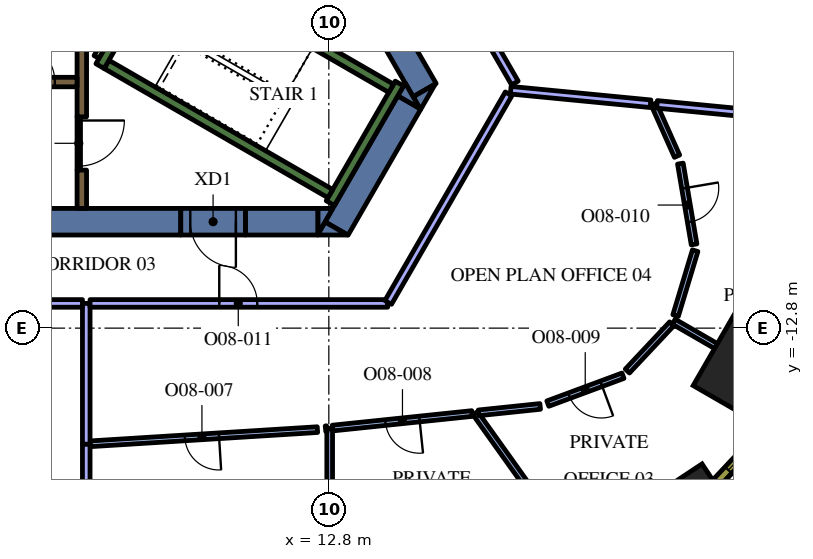
"""IFC4 building model, lengths in metres.
Left out: names, types, materials, properties, quantities, classifications, styles, units other than length and angle.
Written with IfcOpenShell. Run it as: python <this file> out.ifc"""

import sys

from ifc_helpers import new_model, si_unit, direction, frame, frame_2d, origin, origin_2d, place, context, subcontext, project, spatial, polyline, rectangle, outline, extrude, element, fill, save


model = new_model("IFC4")
c1 = context("Model", 3, precision=1e-05, world=origin(), true_north=direction((0.0, 1.0)))
c2 = subcontext(c1, "Body", "Model", "MODEL_VIEW")
j1 = project(units=[si_unit("LENGTHUNIT", "METRE"), si_unit("PLANEANGLEUNIT", "RADIAN")], contexts=[c1])
p1 = place(None, origin())
s1 = spatial("IfcSite", under=j1, at=p1, CompositionType="ELEMENT")
p2 = place(p1, origin())
s2 = spatial("IfcBuilding", under=s1, at=p2, CompositionType="ELEMENT")
p3 = place(p2, frame((0.0, 0.0, 226.8)))
s3 = spatial("IfcBuildingStorey", under=s2, at=p3, CompositionType="ELEMENT", Elevation=226.8)
p4 = place(p3, frame((24.027, -13.872, 0.0), z_axis=(0.0, 0.0, 1.0), x_axis=(0.866025403784, -0.5, 0.0)))
e1 = element("IfcColumn", 1, at=p4, inside=s3, PredefinedType="COLUMN", context=c2, shape_type="SweptSolid", body=[
    extrude(rectangle(XDim=2.4, YDim=2.4, at=origin_2d()), origin(), (0.0, 0.0, 1.0), 4.2),
])
p5 = place(p3, frame((22.494, -16.997, 0.0), z_axis=(0.0, 0.0, 1.0), x_axis=(0.833238868178, 0.552913183563, 0.0)))
e2 = element("IfcColumn", 2, at=p5, inside=s3, PredefinedType="COLUMN", context=c2, shape_type="SweptSolid", body=[
    extrude(rectangle(XDim=0.9, YDim=0.9, at=origin_2d()), origin(), (0.0, 0.0, 1.0), 4.2),
])
p6 = place(p3, frame((9.085, 4.264, 0.0), z_axis=(0.0, 0.0, 1.0), x_axis=(0.499998082512, -0.866026510844, 0.0)))
e3 = element("IfcWall", 3, at=p6, inside=s3, PredefinedType="SOLIDWALL", context=c2, shape_type="SweptSolid", body=[
    extrude(rectangle(XDim=12.472, YDim=0.7, at=frame_2d((6.236, 0.0))), origin(), (0.0, 0.0, 1.0), 4.2),
])
p7 = place(p3, origin())
e4 = element("IfcWall", 4, at=p7, inside=s3, PredefinedType="SOLIDWALL", context=c2, shape_type="SweptSolid", body=[
    extrude(outline(polyline([(15.213, -7.05), (15.019, -6.714), (15.601, -6.378), (15.213, -7.05)])), origin(), (0.0, 0.0, 1.0), 4.2),
])
p8 = place(p3, frame((13.003, -10.179, 0.0), z_axis=(0.0, 0.0, 1.0), x_axis=(0.499972675833, 0.866041178825, 0.0)))
e5 = element("IfcWall", 5, at=p8, inside=s3, PredefinedType="SOLIDWALL", context=c2, shape_type="SweptSolid", body=[
    extrude(rectangle(XDim=3.829, YDim=0.7, at=frame_2d((1.915, 0.0))), origin(), (0.0, 0.0, 1.0), 4.2),
])
e6 = element("IfcWall", 6, at=p7, inside=s3, PredefinedType="SOLIDWALL", context=c2, shape_type="SweptSolid", body=[
    extrude(outline(polyline([(12.698, -10.005), (13.296, -10.35), (12.5, -10.35), (12.698, -10.005)])), origin(), (0.0, 0.0, 1.0), 4.2),
])
e7 = element("IfcWall", 7, at=p7, inside=s3, PredefinedType="SOLIDWALL", context=c2, shape_type="SweptSolid", body=[
    extrude(outline(polyline([(14.809, -6.35), (15.197, -7.022), (14.615, -6.686), (14.809, -6.35)])), origin(), (0.0, 0.0, 1.0), 4.2),
])
p9 = place(p3, frame((10.604, -10.0, 0.0), z_axis=(0.0, 0.0, 1.0), x_axis=(1.0, 0.0, 0.0)))
e8 = element("IfcWall", 8, at=p9, inside=s3, PredefinedType="SOLIDWALL", context=c2, shape_type="SweptSolid", body=[
    extrude(rectangle(XDim=1.909, YDim=0.7, at=frame_2d((0.955, 0.0))), origin(), (0.0, 0.0, 1.0), 4.2),
])
e9 = element("IfcWall", 9, at=p7, inside=s3, PredefinedType="SOLIDWALL", context=c2, shape_type="SweptSolid", body=[
    extrude(outline(polyline([(12.904, -9.65), (12.516, -10.322), (12.516, -9.65), (12.904, -9.65)])), origin(), (0.0, 0.0, 1.0), 4.2),
])
p10 = place(p3, frame((8.904, -10.0, 0.0), z_axis=(0.0, 0.0, 1.0), x_axis=(-1.0, 0.0, 0.0)))
e10 = element("IfcWall", 10, at=p10, inside=s3, PredefinedType="SOLIDWALL", context=c2, shape_type="SweptSolid", body=[
    extrude(rectangle(XDim=22.226, YDim=0.7, at=frame_2d((11.113, 0.0))), origin(), (0.0, 0.0, 1.0), 4.2),
])
p11 = place(p3, frame((12.84, -9.511, 0.0), z_axis=(0.0, 0.0, 1.0), x_axis=(0.500048121057, 0.865997619297, 0.0)))
e11 = element("IfcWall", 11, at=p11, inside=s3, PredefinedType="SOLIDWALL", context=c2, shape_type="SweptSolid", body=[
    extrude(rectangle(XDim=3.634, YDim=0.25, at=frame_2d((1.817, 0.0))), origin(), (0.0, 0.0, 1.0), 4.2),
])
p12 = place(p3, frame((12.84, -9.261, 0.0), z_axis=(0.0, 0.0, 1.0), x_axis=(-0.866013990052, 0.500019768644, 0.0)))
e12 = element("IfcWall", 12, at=p12, inside=s3, PredefinedType="SOLIDWALL", context=c2, shape_type="SweptSolid", body=[
    extrude(rectangle(XDim=6.8, YDim=0.25, at=frame_2d((3.4, 0.0))), origin(), (0.0, 0.0, 1.0), 4.2),
])
p13 = place(p3, frame((6.78, -5.906, 0.0), z_axis=(0.0, 0.0, 1.0), x_axis=(0.500223362819, 0.865896406789, 0.0)))
e13 = element("IfcWall", 13, at=p13, inside=s3, PredefinedType="SOLIDWALL", context=c2, shape_type="SweptSolid", body=[
    extrude(rectangle(XDim=0.675, YDim=0.25, at=frame_2d((0.337, 0.0))), origin(), (0.0, 0.0, 1.0), 4.2),
])
p14 = place(p3, frame((8.334, -2.964, 0.0), z_axis=(0.0, 0.0, 1.0), x_axis=(0.866016039709, -0.500016218704, 0.0)))
e14 = element("IfcWall", 14, at=p14, inside=s3, PredefinedType="SOLIDWALL", context=c2, shape_type="SweptSolid", body=[
    extrude(rectangle(XDim=7.05, YDim=0.25, at=frame_2d((3.525, 0.0))), origin(), (0.0, 0.0, 1.0), 4.2),
])
p15 = place(p3, frame((6.3, -7.24, 0.0), z_axis=(0.0, 0.0, 1.0), x_axis=(0.0, 1.0, 0.0)))
e15 = element("IfcWall", 15, at=p15, inside=s3, PredefinedType="SOLIDWALL", context=c2, shape_type="SweptSolid", body=[
    extrude(rectangle(XDim=3.556, YDim=0.25, at=frame_2d((1.778, 0.0))), origin(), (0.0, 0.0, 1.0), 4.2),
])
p16 = place(p3, frame((6.3, -9.65, 0.0), z_axis=(0.0, 0.0, 1.0), x_axis=(0.0, 1.0, 0.0)))
e16 = element("IfcWall", 16, at=p16, inside=s3, PredefinedType="SOLIDWALL", context=c2, shape_type="SweptSolid", body=[
    extrude(rectangle(XDim=1.008, YDim=0.25, at=frame_2d((0.504, 0.0))), origin(), (0.0, 0.0, 1.0), 4.2),
])
p17 = place(p3, frame((6.945, -5.222, 0.0), z_axis=(0.0, 0.0, 1.0), x_axis=(-0.499818422106, -0.866130212453, 0.0)))
e17 = element("IfcWall", 17, at=p17, inside=s3, PredefinedType="PARTITIONING", context=c2, shape_type="SweptSolid", body=[
    extrude(rectangle(XDim=0.514, YDim=0.15, at=frame_2d((0.257, 0.0))), origin(), (0.0, 0.0, 1.0), 3.45),
])
p18 = place(p3, frame((-6.175, -6.325, 0.0), z_axis=(0.0, 0.0, 1.0), x_axis=(1.0, 0.0, 0.0)))
e18 = element("IfcWall", 18, at=p18, inside=s3, PredefinedType="SOLIDWALL", context=c2, shape_type="SweptSolid", body=[
    extrude(rectangle(XDim=12.35, YDim=0.25, at=frame_2d((6.175, 0.0))), origin(), (0.0, 0.0, 1.0), 4.2),
])
p19 = place(p18, frame((0.585, 0.0, 0.0)))
e19 = element("IfcOpeningElement", 19, at=p19, cuts=e18, PredefinedType="OPENING", context=c2, shape_type="SweptSolid", body=[
    extrude(rectangle(XDim=1.1, YDim=2.1, at=frame_2d((0.55, 1.05))), frame((0.0, 0.135, 0.0), z_axis=(0.0, -1.0, 0.0), x_axis=(1.0, 0.0, 0.0)), (0.0, 0.0, 1.0), 0.27),
])
p20 = place(p18, frame((3.105, 0.0, 0.0)))
e20 = element("IfcOpeningElement", 20, at=p20, cuts=e18, PredefinedType="OPENING", context=c2, shape_type="SweptSolid", body=[
    extrude(rectangle(XDim=1.1, YDim=2.1, at=frame_2d((0.55, 1.05))), frame((0.0, 0.135, 0.0), z_axis=(0.0, -1.0, 0.0), x_axis=(1.0, 0.0, 0.0)), (0.0, 0.0, 1.0), 0.27),
])
p21 = place(p18, frame((5.625, 0.0, 0.0)))
e21 = element("IfcOpeningElement", 21, at=p21, cuts=e18, PredefinedType="OPENING", context=c2, shape_type="SweptSolid", body=[
    extrude(rectangle(XDim=1.1, YDim=2.1, at=frame_2d((0.55, 1.05))), frame((0.0, 0.135, 0.0), z_axis=(0.0, -1.0, 0.0), x_axis=(1.0, 0.0, 0.0)), (0.0, 0.0, 1.0), 0.27),
])
p22 = place(p18, frame((8.145, 0.0, 0.0)))
e22 = element("IfcOpeningElement", 22, at=p22, cuts=e18, PredefinedType="OPENING", context=c2, shape_type="SweptSolid", body=[
    extrude(rectangle(XDim=1.1, YDim=2.1, at=frame_2d((0.55, 1.05))), frame((0.0, 0.135, 0.0), z_axis=(0.0, -1.0, 0.0), x_axis=(1.0, 0.0, 0.0)), (0.0, 0.0, 1.0), 0.27),
])
p23 = place(p18, frame((10.665, 0.0, 0.0)))
e23 = element("IfcOpeningElement", 23, at=p23, cuts=e18, PredefinedType="OPENING", context=c2, shape_type="SweptSolid", body=[
    extrude(rectangle(XDim=1.1, YDim=2.1, at=frame_2d((0.55, 1.05))), frame((0.0, 0.135, 0.0), z_axis=(0.0, -1.0, 0.0), x_axis=(1.0, 0.0, 0.0)), (0.0, 0.0, 1.0), 0.27),
])
p24 = place(p3, frame((6.22, -7.237, 0.0), z_axis=(0.0, 0.0, 1.0), x_axis=(0.0, -1.0, 0.0)))
e24 = element("IfcWall", 24, at=p24, inside=s3, PredefinedType="PARTITIONING", context=c2, shape_type="SweptSolid", body=[
    extrude(rectangle(XDim=1.4, YDim=0.09, at=frame_2d((0.7, 0.0))), origin(), (0.0, 0.0, 1.0), 3.45),
])
p25 = place(p24, frame((0.1, 0.0, 0.0)))
e25 = element("IfcOpeningElement", 25, at=p25, cuts=e24, PredefinedType="OPENING", context=c2, shape_type="SweptSolid", body=[
    extrude(rectangle(XDim=1.2, YDim=2.1, at=frame_2d((0.6, 1.05))), frame((0.0, 0.055, 0.0), z_axis=(0.0, -1.0, 0.0), x_axis=(1.0, 0.0, 0.0)), (0.0, 0.0, 1.0), 0.11),
])
p26 = place(p3, frame((10.604, -10.0, 0.0), z_axis=(0.0, 0.0, 1.0), x_axis=(-1.0, 0.0, 0.0)))
e26 = element("IfcWall", 26, at=p26, inside=s3, PredefinedType="SOLIDWALL", context=c2, shape_type="SweptSolid", body=[
    extrude(rectangle(XDim=1.7, YDim=0.7, at=frame_2d((0.85, 0.0))), origin(), (0.0, 0.0, 1.0), 4.2),
])
p27 = place(p26, frame((0.25, 0.0, 0.0)))
e27 = element("IfcOpeningElement", 27, at=p27, cuts=e26, PredefinedType="OPENING", context=c2, shape_type="SweptSolid", body=[
    extrude(rectangle(XDim=1.2, YDim=2.1, at=frame_2d((0.6, 1.05))), frame((0.0, 0.36, 0.0), z_axis=(0.0, -1.0, 0.0), x_axis=(1.0, 0.0, 0.0)), (0.0, 0.0, 1.0), 0.72),
])
p28 = place(p3, frame((6.417, -15.846, 0.0), z_axis=(0.0, 0.0, 1.0), x_axis=(0.0, -1.0, 0.0)))
e28 = element("IfcWall", 28, at=p28, inside=s3, PredefinedType="PARTITIONING", context=c2, shape_type="SweptSolid", body=[
    extrude(rectangle(XDim=3.051, YDim=0.2, at=frame_2d((1.525, 0.0))), origin(), (0.0, 0.0, 1.0), 3.45),
])
p29 = place(p3, frame((6.417, -12.15, 0.0), z_axis=(0.0, 0.0, 1.0), x_axis=(0.0, -1.0, 0.0)))
e29 = element("IfcWall", 29, at=p29, inside=s3, PredefinedType="PARTITIONING", context=c2, shape_type="SweptSolid", body=[
    extrude(rectangle(XDim=3.704, YDim=0.2, at=frame_2d((1.852, 0.0))), origin(), (0.0, 0.0, 1.0), 3.45),
])
p30 = place(p3, frame((4.53, -12.15, 0.0), z_axis=(0.0, 0.0, 1.0), x_axis=(1.0, 0.0, 0.0)))
e30 = element("IfcWall", 30, at=p30, inside=s3, PredefinedType="PARTITIONING", context=c2, shape_type="SweptSolid", body=[
    extrude(rectangle(XDim=1.787, YDim=0.2, at=frame_2d((0.894, 0.0))), origin(), (0.0, 0.0, 1.0), 3.45),
])
p31 = place(p3, frame((12.823, -15.437, 0.0), z_axis=(0.0, 0.0, 1.0), x_axis=(0.0, -1.0, 0.0)))
e31 = element("IfcWall", 31, at=p31, inside=s3, PredefinedType="PARTITIONING", context=c2, shape_type="SweptSolid", body=[
    extrude(rectangle(XDim=3.058, YDim=0.15, at=frame_2d((1.529, 0.0))), origin(), (0.0, 0.0, 1.0), 3.45),
])
p32 = place(p3, frame((12.5, -15.471, 0.0), z_axis=(0.0, 0.0, 1.0), x_axis=(-0.998061916726, -0.0622286942, 0.0)))
e32 = element("IfcWall", 32, at=p32, inside=s3, PredefinedType="PARTITIONING", context=c2, shape_type="SweptSolid", body=[
    extrude(rectangle(XDim=5.995, YDim=0.15, at=frame_2d((2.998, 0.0))), origin(), (0.0, 0.0, 1.0), 3.45),
])
p33 = place(p32, frame((2.595, 0.0, 0.0)))
e33 = element("IfcOpeningElement", 33, at=p33, cuts=e32, PredefinedType="OPENING", context=c2, shape_type="SweptSolid", body=[
    extrude(rectangle(XDim=0.9, YDim=2.1, at=frame_2d((0.45, 1.05))), frame((0.0, 0.085, 0.0), z_axis=(0.0, -1.0, 0.0), x_axis=(1.0, 0.0, 0.0)), (0.0, 0.0, 1.0), 0.17),
])
p34 = place(p3, frame((12.713, -15.448, 0.0), z_axis=(0.0, 0.0, 1.0), x_axis=(0.995106821048, 0.098804932586, 0.0)))
e34 = element("IfcWall", 34, at=p34, inside=s3, PredefinedType="PARTITIONING", context=c2, shape_type="SweptSolid", body=[
    extrude(rectangle(XDim=0.035, YDim=0.15, at=frame_2d((0.017, 0.0))), origin(), (0.0, 0.0, 1.0), 3.45),
])
p35 = place(p3, frame((16.655, -15.038, 0.0), z_axis=(0.0, 0.0, 1.0), x_axis=(0.580996489012, -0.813906063226, 0.0)))
e35 = element("IfcWall", 35, at=p35, inside=s3, PredefinedType="PARTITIONING", context=c2, shape_type="SweptSolid", body=[
    extrude(rectangle(XDim=3.536, YDim=0.15, at=frame_2d((1.768, 0.0))), origin(), (0.0, 0.0, 1.0), 3.45),
])
p36 = place(p3, frame((16.569, -15.047, 0.0), z_axis=(0.0, 0.0, 1.0), x_axis=(-0.994621532294, -0.103576095197, 0.0)))
e36 = element("IfcWall", 36, at=p36, inside=s3, PredefinedType="PARTITIONING", context=c2, shape_type="SweptSolid", body=[
    extrude(rectangle(XDim=3.691, YDim=0.15, at=frame_2d((1.846, 0.0))), origin(), (0.0, 0.0, 1.0), 3.45),
])
p37 = place(p36, frame((1.391, 0.0, 0.0)))
e37 = element("IfcOpeningElement", 37, at=p37, cuts=e36, PredefinedType="OPENING", context=c2, shape_type="SweptSolid", body=[
    extrude(rectangle(XDim=0.9, YDim=2.1, at=frame_2d((0.45, 1.05))), frame((0.0, 0.085, 0.0), z_axis=(0.0, -1.0, 0.0), x_axis=(1.0, 0.0, 0.0)), (0.0, 0.0, 1.0), 0.17),
])
p38 = place(p3, frame((21.877, -12.63, 0.0), z_axis=(0.0, 0.0, 1.0), x_axis=(0.86599869919, -0.500046250861, 0.0)))
e38 = element("IfcWall", 38, at=p38, inside=s3, PredefinedType="PARTITIONING", context=c2, shape_type="SweptSolid", body=[
    extrude(rectangle(XDim=1.284, YDim=0.15, at=frame_2d((0.642, 0.0))), origin(), (0.0, 0.0, 1.0), 3.45),
])
p39 = place(p3, frame((16.74, -15.029, 0.0), z_axis=(0.0, 0.0, 1.0), x_axis=(0.994614871477, 0.103640037805, 0.0)))
e39 = element("IfcWall", 39, at=p39, inside=s3, PredefinedType="PARTITIONING", context=c2, shape_type="SweptSolid", body=[
    extrude(rectangle(XDim=1.63, YDim=0.15, at=frame_2d((0.815, 0.0))), origin(), (0.0, 0.0, 1.0), 3.45),
])
p40 = place(p3, frame((20.541, -14.052, 0.0), z_axis=(0.0, 0.0, 1.0), x_axis=(-0.937602119917, -0.347710029662, 0.0)))
e40 = element("IfcWall", 40, at=p40, inside=s3, PredefinedType="PARTITIONING", context=c2, shape_type="SweptSolid", body=[
    extrude(rectangle(XDim=2.11, YDim=0.15, at=frame_2d((1.055, 0.0))), origin(), (0.0, 0.0, 1.0), 3.45),
])
p41 = place(p40, frame((0.61, 0.0, 0.0)))
e41 = element("IfcOpeningElement", 41, at=p41, cuts=e40, PredefinedType="OPENING", context=c2, shape_type="SweptSolid", body=[
    extrude(rectangle(XDim=0.9, YDim=2.1, at=frame_2d((0.45, 1.05))), frame((0.0, 0.085, 0.0), z_axis=(0.0, -1.0, 0.0), x_axis=(1.0, 0.0, 0.0)), (0.0, 0.0, 1.0), 0.17),
])
p42 = place(p3, frame((20.656, -13.929, 0.0), z_axis=(0.0, 0.0, 1.0), x_axis=(0.684716940988, 0.728809104447, 0.0)))
e42 = element("IfcWall", 42, at=p42, inside=s3, PredefinedType="PARTITIONING", context=c2, shape_type="SweptSolid", body=[
    extrude(rectangle(XDim=1.705, YDim=0.15, at=frame_2d((0.853, 0.0))), origin(), (0.0, 0.0, 1.0), 3.45),
])
p43 = place(p3, frame((21.925, -12.469, 0.0), z_axis=(0.0, 0.0, 1.0), x_axis=(0.288767705809, 0.957399191603, 0.0)))
e43 = element("IfcWall", 43, at=p43, inside=s3, PredefinedType="PARTITIONING", context=c2, shape_type="SweptSolid", body=[
    extrude(rectangle(XDim=1.782, YDim=0.15, at=frame_2d((0.891, 0.0))), origin(), (0.0, 0.0, 1.0), 3.45),
])
p44 = place(p3, frame((22.05, -8.471, 0.0), z_axis=(0.0, 0.0, 1.0), x_axis=(0.167612004459, -0.985853039738, 0.0)))
e44 = element("IfcWall", 44, at=p44, inside=s3, PredefinedType="PARTITIONING", context=c2, shape_type="SweptSolid", body=[
    extrude(rectangle(XDim=2.156, YDim=0.15, at=frame_2d((1.078, 0.0))), origin(), (0.0, 0.0, 1.0), 3.45),
])
p45 = place(p44, frame((0.656, 0.0, 0.0)))
e45 = element("IfcOpeningElement", 45, at=p45, cuts=e44, PredefinedType="OPENING", context=c2, shape_type="SweptSolid", body=[
    extrude(rectangle(XDim=0.9, YDim=2.1, at=frame_2d((0.45, 1.05))), frame((0.0, 0.085, 0.0), z_axis=(0.0, -1.0, 0.0), x_axis=(1.0, 0.0, 0.0)), (0.0, 0.0, 1.0), 0.17),
])
p46 = place(p3, frame((21.963, -8.276, 0.0), z_axis=(0.0, 0.0, 1.0), x_axis=(-0.407510458183, 0.913200540118, 0.0)))
e46 = element("IfcWall", 46, at=p46, inside=s3, PredefinedType="PARTITIONING", context=c2, shape_type="SweptSolid", body=[
    extrude(rectangle(XDim=1.502, YDim=0.15, at=frame_2d((0.751, 0.0))), origin(), (0.0, 0.0, 1.0), 3.45),
])
p47 = place(p3, frame((21.437, -6.913, 0.0), z_axis=(0.0, 0.0, 1.0), x_axis=(0.995357015301, -0.096251816042, 0.0)))
e47 = element("IfcWall", 47, at=p47, inside=s3, PredefinedType="PARTITIONING", context=c2, shape_type="SweptSolid", body=[
    extrude(rectangle(XDim=3.45, YDim=0.2, at=frame_2d((1.725, 0.0))), origin(), (0.0, 0.0, 1.0), 3.45),
])
p48 = place(p3, frame((17.586, -6.54, 0.0), z_axis=(0.0, 0.0, 1.0), x_axis=(0.995358181524, -0.096239755158, 0.0)))
e48 = element("IfcWall", 48, at=p48, inside=s3, PredefinedType="PARTITIONING", context=c2, shape_type="SweptSolid", body=[
    extrude(rectangle(XDim=3.696, YDim=0.2, at=frame_2d((1.848, 0.0))), origin(), (0.0, 0.0, 1.0), 3.45),
])
p49 = place(p3, frame((6.517, -12.15, 0.0), z_axis=(0.0, 0.0, 1.0), x_axis=(1.0, 0.0, 0.0)))
e49 = element("IfcWall", 49, at=p49, inside=s3, PredefinedType="PARTITIONING", context=c2, shape_type="SweptSolid", body=[
    extrude(rectangle(XDim=7.83, YDim=0.2, at=frame_2d((3.915, 0.0))), origin(), (0.0, 0.0, 1.0), 3.45),
])
p50 = place(p49, frame((3.4, 0.0, 0.0)))
e50 = element("IfcOpeningElement", 50, at=p50, cuts=e49, PredefinedType="OPENING", context=c2, shape_type="SweptSolid", body=[
    extrude(rectangle(XDim=1.0, YDim=2.1, at=frame_2d((0.5, 1.05))), frame((0.0, 0.11, 0.0), z_axis=(0.0, -1.0, 0.0), x_axis=(1.0, 0.0, 0.0)), (0.0, 0.0, 1.0), 0.22),
])
p51 = place(p3, frame((14.362, -12.124, 0.0), z_axis=(0.0, 0.0, 1.0), x_axis=(0.500017005442, 0.866015585465, 0.0)))
e51 = element("IfcWall", 51, at=p51, inside=s3, PredefinedType="PARTITIONING", context=c2, shape_type="SweptSolid", body=[
    extrude(rectangle(XDim=6.338, YDim=0.2, at=frame_2d((3.169, 0.0))), origin(), (0.0, 0.0, 1.0), 3.45),
])
p52 = place(p3, frame((17.696, -6.35, 0.0), z_axis=(0.0, 0.0, 1.0), x_axis=(-0.499976825411, 0.866038783226, 0.0)))
e52 = element("IfcWall", 52, at=p52, inside=s3, PredefinedType="PARTITIONING", context=c2, shape_type="SweptSolid", body=[
    extrude(rectangle(XDim=4.653, YDim=0.2, at=frame_2d((2.326, 0.0))), origin(), (0.0, 0.0, 1.0), 3.45),
])
p53 = place(p3, frame((22.989, -16.879, 0.0), z_axis=(0.0, 0.0, 1.0), x_axis=(0.684770274166, 0.728758994194, 0.0)))
e53 = element("IfcWall", 53, at=p53, inside=s3, PredefinedType="SOLIDWALL", context=c2, shape_type="SweptSolid", body=[
    extrude(rectangle(XDim=1.948, YDim=0.24, at=frame_2d((0.974, 0.0))), origin(), (0.0, 0.0, 1.0), 3.95),
])
p54 = place(p53, frame((0.474, 0.0, 0.9)))
e54 = element("IfcOpeningElement", 54, at=p54, cuts=e53, PredefinedType="OPENING", context=c2, shape_type="SweptSolid", body=[
    extrude(rectangle(XDim=1.0, YDim=2.55, at=frame_2d((0.5, 1.275))), frame((0.0, 0.13, 0.0), z_axis=(0.0, -1.0, 0.0), x_axis=(1.0, 0.0, 0.0)), (0.0, 0.0, 1.0), 0.26),
])
p55 = place(p3, frame((25.405, -6.861, 0.0), z_axis=(0.0, 0.0, 1.0), x_axis=(-0.407579651789, 0.913169659728, 0.0)))
e55 = element("IfcWall", 55, at=p55, inside=s3, PredefinedType="SOLIDWALL", context=c2, shape_type="SweptSolid", body=[
    extrude(rectangle(XDim=5.311, YDim=0.24, at=frame_2d((2.655, 0.0))), origin(), (0.0, 0.0, 1.0), 3.95),
])
p56 = place(p55, frame((0.271, 0.0, 0.9)))
e56 = element("IfcOpeningElement", 56, at=p56, cuts=e55, PredefinedType="OPENING", context=c2, shape_type="SweptSolid", body=[
    extrude(rectangle(XDim=1.5, YDim=2.55, at=frame_2d((0.75, 1.275))), frame((0.0, 0.13, 0.0), z_axis=(0.0, -1.0, 0.0), x_axis=(1.0, 0.0, 0.0)), (0.0, 0.0, 1.0), 0.26),
])
p57 = place(p55, frame((3.504, 0.0, 0.9)))
e57 = element("IfcOpeningElement", 57, at=p57, cuts=e55, PredefinedType="OPENING", context=c2, shape_type="SweptSolid", body=[
    extrude(rectangle(XDim=1.5, YDim=2.55, at=frame_2d((0.75, 1.275))), frame((0.0, 0.13, 0.0), z_axis=(0.0, -1.0, 0.0), x_axis=(1.0, 0.0, 0.0)), (0.0, 0.0, 1.0), 0.26),
])
p58 = place(p23, origin())
e58 = element("IfcDoor", 58, at=p58, inside=s3, OperationType="DOUBLE_DOOR_SLIDING", PredefinedType="DOOR", context=c2, shape_type="SweptSolid", body=[
    extrude(rectangle(XDim=1.1, YDim=2.1, at=frame_2d((0.55, 1.05))), frame((0.0, 0.025, 0.0), z_axis=(0.0, -1.0, 0.0), x_axis=(1.0, 0.0, 0.0)), (0.0, 0.0, 1.0), 0.05),
])
fill(e23, e58)
p59 = place(p25, origin())
e59 = element("IfcDoor", 59, at=p59, inside=s3, OperationType="SINGLE_SWING_LEFT", PredefinedType="DOOR", context=c2, shape_type="SweptSolid", body=[
    extrude(rectangle(XDim=1.2, YDim=2.1, at=frame_2d((0.6, 1.05))), frame((0.0, 0.025, 0.0), z_axis=(0.0, -1.0, 0.0), x_axis=(1.0, 0.0, 0.0)), (0.0, 0.0, 1.0), 0.05),
])
fill(e25, e59)
p60 = place(p27, origin())
e60 = element("IfcDoor", 60, at=p60, inside=s3, OperationType="SINGLE_SWING_LEFT", PredefinedType="DOOR", context=c2, shape_type="SweptSolid", body=[
    extrude(rectangle(XDim=1.2, YDim=2.1, at=frame_2d((0.6, 1.05))), frame((0.0, 0.025, 0.0), z_axis=(0.0, -1.0, 0.0), x_axis=(1.0, 0.0, 0.0)), (0.0, 0.0, 1.0), 0.05),
])
fill(e27, e60)
p61 = place(p33, origin())
e61 = element("IfcDoor", 61, at=p61, inside=s3, OperationType="SINGLE_SWING_RIGHT", PredefinedType="DOOR", context=c2, shape_type="SweptSolid", body=[
    extrude(rectangle(XDim=0.9, YDim=2.1, at=frame_2d((0.45, 1.05))), frame((0.0, 0.025, 0.0), z_axis=(0.0, -1.0, 0.0), x_axis=(1.0, 0.0, 0.0)), (0.0, 0.0, 1.0), 0.05),
])
fill(e33, e61)
p62 = place(p37, origin())
e62 = element("IfcDoor", 62, at=p62, inside=s3, OperationType="SINGLE_SWING_LEFT", PredefinedType="DOOR", context=c2, shape_type="SweptSolid", body=[
    extrude(rectangle(XDim=0.9, YDim=2.1, at=frame_2d((0.45, 1.05))), frame((0.0, 0.025, 0.0), z_axis=(0.0, -1.0, 0.0), x_axis=(1.0, 0.0, 0.0)), (0.0, 0.0, 1.0), 0.05),
])
fill(e37, e62)
p63 = place(p41, origin())
e63 = element("IfcDoor", 63, at=p63, inside=s3, OperationType="SINGLE_SWING_RIGHT", PredefinedType="DOOR", context=c2, shape_type="SweptSolid", body=[
    extrude(rectangle(XDim=0.9, YDim=2.1, at=frame_2d((0.45, 1.05))), frame((0.0, 0.025, 0.0), z_axis=(0.0, -1.0, 0.0), x_axis=(1.0, 0.0, 0.0)), (0.0, 0.0, 1.0), 0.05),
])
fill(e41, e63)
p64 = place(p45, origin())
e64 = element("IfcDoor", 64, at=p64, inside=s3, OperationType="SINGLE_SWING_RIGHT", PredefinedType="DOOR", context=c2, shape_type="SweptSolid", body=[
    extrude(rectangle(XDim=0.9, YDim=2.1, at=frame_2d((0.45, 1.05))), frame((0.0, 0.025, 0.0), z_axis=(0.0, -1.0, 0.0), x_axis=(1.0, 0.0, 0.0)), (0.0, 0.0, 1.0), 0.05),
])
fill(e45, e64)
p65 = place(p50, origin())
e65 = element("IfcDoor", 65, at=p65, inside=s3, OperationType="SINGLE_SWING_LEFT", PredefinedType="DOOR", context=c2, shape_type="SweptSolid", body=[
    extrude(rectangle(XDim=1.0, YDim=2.1, at=frame_2d((0.5, 1.05))), frame((0.0, 0.025, 0.0), z_axis=(0.0, -1.0, 0.0), x_axis=(1.0, 0.0, 0.0)), (0.0, 0.0, 1.0), 0.05),
])
fill(e50, e65)
p66 = place(p54, origin())
e66 = element("IfcWindow", 66, at=p66, inside=s3, PartitioningType="SINGLE_PANEL", PredefinedType="WINDOW", context=c2, shape_type="SweptSolid", body=[
    extrude(rectangle(XDim=1.0, YDim=2.55, at=frame_2d((0.5, 1.275))), frame((0.0, 0.04, 0.0), z_axis=(0.0, -1.0, 0.0), x_axis=(1.0, 0.0, 0.0)), (0.0, 0.0, 1.0), 0.06),
])
fill(e54, e66)
save(model, sys.argv[1])
